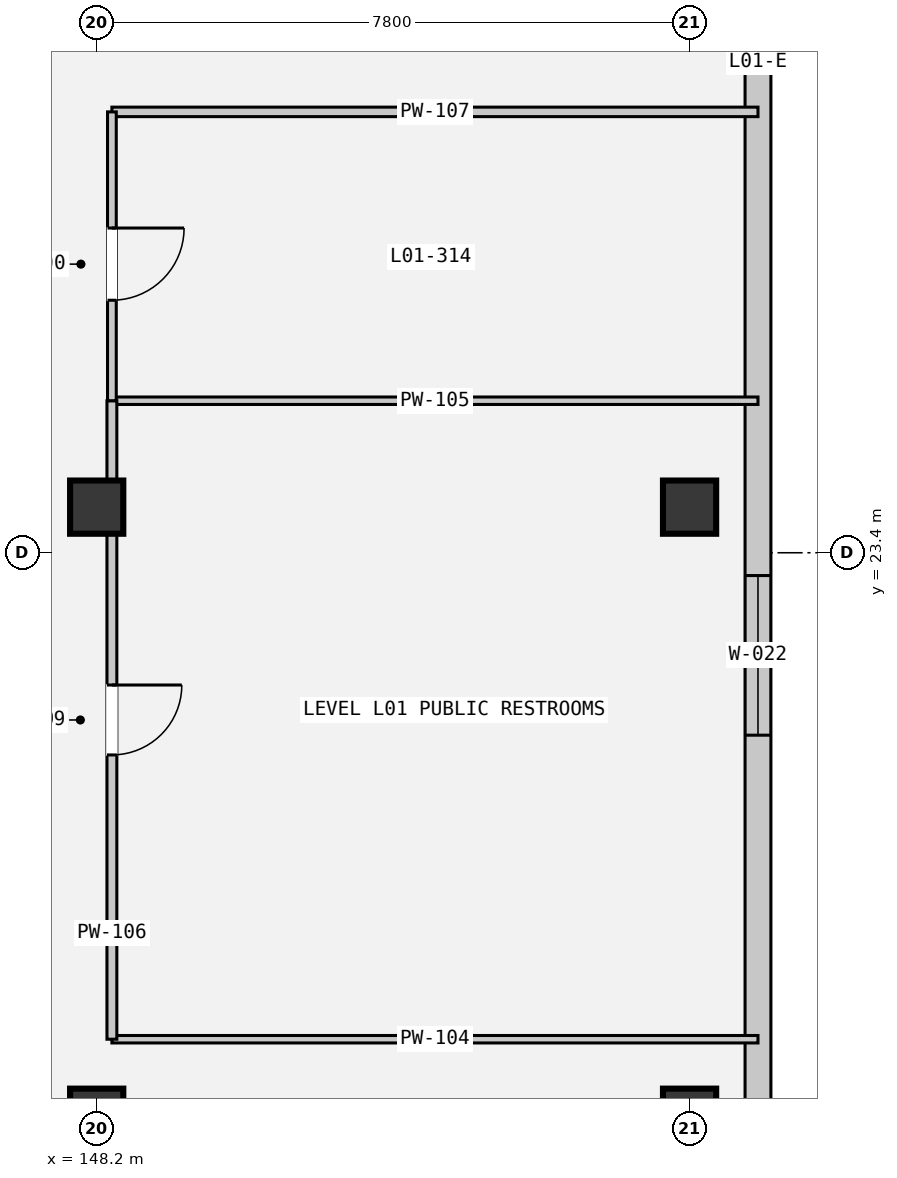
"""IFC4 building model, lengths in metres.
Left out: names, types, materials, properties, quantities, classifications, styles, units other than length and angle.
Written with IfcOpenShell. Run it as: python <this file> out.ifc"""

import sys

from ifc_helpers import new_model, si_unit, direction, frame, frame_2d, origin, origin_2d, place, context, subcontext, project, spatial, rectangle, extrude, element, fill, save


model = new_model("IFC4")
c1 = context("Model", 3, precision=1e-05, world=origin(), true_north=direction((0.0, 1.0)))
c2 = subcontext(c1, "Body", "Model", "MODEL_VIEW")
j1 = project(units=[si_unit("LENGTHUNIT", "METRE"), si_unit("PLANEANGLEUNIT", "RADIAN")], contexts=[c1])
p1 = place(None, origin())
s1 = spatial("IfcSite", under=j1, at=p1, CompositionType="ELEMENT")
p2 = place(p1, origin())
s2 = spatial("IfcBuilding", under=s1, at=p2, CompositionType="ELEMENT")
p3 = place(p2, frame((0.0, 0.0, 5.4)))
s3 = spatial("IfcBuildingStorey", under=s2, at=p3, CompositionType="ELEMENT", Elevation=5.4)
for number, where, z_axis, x_axis in (
    (1, (148.2, 16.0, 0.0), (0.0, 0.0, 1.0), (1.0, 0.0, 0.0)),
    (2, (148.2, 24.0, 0.0), (0.0, 0.0, 1.0), (1.0, 0.0, 0.0)),
    (3, (156.0, 16.0, 0.0), (0.0, 0.0, 1.0), (1.0, 0.0, 0.0)),
    (4, (156.0, 24.0, 0.0), (0.0, 0.0, 1.0), (1.0, 0.0, 0.0)),
):
    element("IfcColumn", number, at=place(p3, frame(where, z_axis=z_axis, x_axis=x_axis)), inside=s3, PredefinedType="COLUMN", context=c2, shape_type="SweptSolid", body=[
        extrude(rectangle(XDim=0.7, YDim=0.7, at=origin_2d()), origin(), (0.0, 0.0, 1.0), 4.8),
    ])
p4 = place(p3, frame((156.9, 16.0, 0.0), z_axis=(0.0, 0.0, 1.0), x_axis=(0.0, 1.0, 0.0)))
e5 = element("IfcWall", 5, at=p4, inside=s3, PredefinedType="SOLIDWALL", context=c2, shape_type="SweptSolid", body=[
    extrude(rectangle(XDim=100.6, YDim=0.34, at=frame_2d((50.3, 0.0))), origin(), (0.0, 0.0, 1.0), 3.86),
])
p5 = place(p4, frame((5.0, 0.0, 0.78)))
e6 = element("IfcOpeningElement", 6, at=p5, cuts=e5, PredefinedType="OPENING", context=c2, shape_type="SweptSolid", body=[
    extrude(rectangle(XDim=2.1, YDim=2.6, at=frame_2d((1.05, 1.3))), frame((0.0, 0.18, 0.0), z_axis=(0.0, -1.0, 0.0), x_axis=(1.0, 0.0, 0.0)), (0.0, 0.0, 1.0), 0.36),
])
p6 = place(p4, frame((20.6, 0.0, 0.78)))
e7 = element("IfcOpeningElement", 7, at=p6, cuts=e5, PredefinedType="OPENING", context=c2, shape_type="SweptSolid", body=[
    extrude(rectangle(XDim=2.1, YDim=2.6, at=frame_2d((1.05, 1.3))), frame((0.0, 0.18, 0.0), z_axis=(0.0, -1.0, 0.0), x_axis=(1.0, 0.0, 0.0)), (0.0, 0.0, 1.0), 0.36),
])
p7 = place(p4, frame((24.5, 0.0, 0.78)))
e8 = element("IfcOpeningElement", 8, at=p7, cuts=e5, PredefinedType="OPENING", context=c2, shape_type="SweptSolid", body=[
    extrude(rectangle(XDim=2.1, YDim=2.6, at=frame_2d((1.05, 1.3))), frame((0.0, 0.18, 0.0), z_axis=(0.0, -1.0, 0.0), x_axis=(1.0, 0.0, 0.0)), (0.0, 0.0, 1.0), 0.36),
])
p8 = place(p4, frame((28.4, 0.0, 0.78)))
e9 = element("IfcOpeningElement", 9, at=p8, cuts=e5, PredefinedType="OPENING", context=c2, shape_type="SweptSolid", body=[
    extrude(rectangle(XDim=2.1, YDim=2.6, at=frame_2d((1.05, 1.3))), frame((0.0, 0.18, 0.0), z_axis=(0.0, -1.0, 0.0), x_axis=(1.0, 0.0, 0.0)), (0.0, 0.0, 1.0), 0.36),
])
p9 = place(p4, frame((32.3, 0.0, 0.78)))
e10 = element("IfcOpeningElement", 10, at=p9, cuts=e5, PredefinedType="OPENING", context=c2, shape_type="SweptSolid", body=[
    extrude(rectangle(XDim=2.1, YDim=2.6, at=frame_2d((1.05, 1.3))), frame((0.0, 0.18, 0.0), z_axis=(0.0, -1.0, 0.0), x_axis=(1.0, 0.0, 0.0)), (0.0, 0.0, 1.0), 0.36),
])
p10 = place(p4, frame((36.2, 0.0, 0.78)))
e11 = element("IfcOpeningElement", 11, at=p10, cuts=e5, PredefinedType="OPENING", context=c2, shape_type="SweptSolid", body=[
    extrude(rectangle(XDim=2.1, YDim=2.6, at=frame_2d((1.05, 1.3))), frame((0.0, 0.18, 0.0), z_axis=(0.0, -1.0, 0.0), x_axis=(1.0, 0.0, 0.0)), (0.0, 0.0, 1.0), 0.36),
])
p11 = place(p4, frame((40.1, 0.0, 0.78)))
e12 = element("IfcOpeningElement", 12, at=p11, cuts=e5, PredefinedType="OPENING", context=c2, shape_type="SweptSolid", body=[
    extrude(rectangle(XDim=2.1, YDim=2.6, at=frame_2d((1.05, 1.3))), frame((0.0, 0.18, 0.0), z_axis=(0.0, -1.0, 0.0), x_axis=(1.0, 0.0, 0.0)), (0.0, 0.0, 1.0), 0.36),
])
p12 = place(p4, frame((44.0, 0.0, 0.78)))
e13 = element("IfcOpeningElement", 13, at=p12, cuts=e5, PredefinedType="OPENING", context=c2, shape_type="SweptSolid", body=[
    extrude(rectangle(XDim=2.1, YDim=2.6, at=frame_2d((1.05, 1.3))), frame((0.0, 0.18, 0.0), z_axis=(0.0, -1.0, 0.0), x_axis=(1.0, 0.0, 0.0)), (0.0, 0.0, 1.0), 0.36),
])
p13 = place(p4, frame((47.9, 0.0, 0.78)))
e14 = element("IfcOpeningElement", 14, at=p13, cuts=e5, PredefinedType="OPENING", context=c2, shape_type="SweptSolid", body=[
    extrude(rectangle(XDim=2.1, YDim=2.6, at=frame_2d((1.05, 1.3))), frame((0.0, 0.18, 0.0), z_axis=(0.0, -1.0, 0.0), x_axis=(1.0, 0.0, 0.0)), (0.0, 0.0, 1.0), 0.36),
])
p14 = place(p4, frame((51.8, 0.0, 0.78)))
e15 = element("IfcOpeningElement", 15, at=p14, cuts=e5, PredefinedType="OPENING", context=c2, shape_type="SweptSolid", body=[
    extrude(rectangle(XDim=2.1, YDim=2.6, at=frame_2d((1.05, 1.3))), frame((0.0, 0.18, 0.0), z_axis=(0.0, -1.0, 0.0), x_axis=(1.0, 0.0, 0.0)), (0.0, 0.0, 1.0), 0.36),
])
p15 = place(p4, frame((63.5, 0.0, 0.78)))
e16 = element("IfcOpeningElement", 16, at=p15, cuts=e5, PredefinedType="OPENING", context=c2, shape_type="SweptSolid", body=[
    extrude(rectangle(XDim=2.1, YDim=2.6, at=frame_2d((1.05, 1.3))), frame((0.0, 0.18, 0.0), z_axis=(0.0, -1.0, 0.0), x_axis=(1.0, 0.0, 0.0)), (0.0, 0.0, 1.0), 0.36),
])
p16 = place(p4, frame((67.4, 0.0, 0.78)))
e17 = element("IfcOpeningElement", 17, at=p16, cuts=e5, PredefinedType="OPENING", context=c2, shape_type="SweptSolid", body=[
    extrude(rectangle(XDim=2.1, YDim=2.6, at=frame_2d((1.05, 1.3))), frame((0.0, 0.18, 0.0), z_axis=(0.0, -1.0, 0.0), x_axis=(1.0, 0.0, 0.0)), (0.0, 0.0, 1.0), 0.36),
])
p17 = place(p4, frame((71.3, 0.0, 0.78)))
e18 = element("IfcOpeningElement", 18, at=p17, cuts=e5, PredefinedType="OPENING", context=c2, shape_type="SweptSolid", body=[
    extrude(rectangle(XDim=2.1, YDim=2.6, at=frame_2d((1.05, 1.3))), frame((0.0, 0.18, 0.0), z_axis=(0.0, -1.0, 0.0), x_axis=(1.0, 0.0, 0.0)), (0.0, 0.0, 1.0), 0.36),
])
p18 = place(p4, frame((79.1, 0.0, 0.78)))
e19 = element("IfcOpeningElement", 19, at=p18, cuts=e5, PredefinedType="OPENING", context=c2, shape_type="SweptSolid", body=[
    extrude(rectangle(XDim=2.1, YDim=2.6, at=frame_2d((1.05, 1.3))), frame((0.0, 0.18, 0.0), z_axis=(0.0, -1.0, 0.0), x_axis=(1.0, 0.0, 0.0)), (0.0, 0.0, 1.0), 0.36),
])
p19 = place(p4, frame((86.9, 0.0, 0.78)))
e20 = element("IfcOpeningElement", 20, at=p19, cuts=e5, PredefinedType="OPENING", context=c2, shape_type="SweptSolid", body=[
    extrude(rectangle(XDim=2.1, YDim=2.6, at=frame_2d((1.05, 1.3))), frame((0.0, 0.18, 0.0), z_axis=(0.0, -1.0, 0.0), x_axis=(1.0, 0.0, 0.0)), (0.0, 0.0, 1.0), 0.36),
])
p20 = place(p4, frame((94.7, 0.0, 0.78)))
e21 = element("IfcOpeningElement", 21, at=p20, cuts=e5, PredefinedType="OPENING", context=c2, shape_type="SweptSolid", body=[
    extrude(rectangle(XDim=2.1, YDim=2.6, at=frame_2d((1.05, 1.3))), frame((0.0, 0.18, 0.0), z_axis=(0.0, -1.0, 0.0), x_axis=(1.0, 0.0, 0.0)), (0.0, 0.0, 1.0), 0.36),
])
for number, where, z_axis, x_axis in (
    (22, (148.4, 17.0, 0.0), (0.0, 0.0, 1.0), (1.0, 0.0, 0.0)),
    (23, (156.9, 25.4, 0.0), (0.0, 0.0, 1.0), (-1.0, 0.0, 0.0)),
):
    element("IfcWall", number, at=place(p3, frame(where, z_axis=z_axis, x_axis=x_axis)), inside=s3, PredefinedType="PARTITIONING", context=c2, shape_type="SweptSolid", body=[
        extrude(rectangle(XDim=8.5, YDim=0.098, at=frame_2d((4.25, 0.0))), origin(), (0.0, 0.0, 1.0), 3.45),
    ])
p21 = place(p3, frame((148.4, 25.4, 0.0), z_axis=(0.0, 0.0, 1.0), x_axis=(0.0, -1.0, 0.0)))
e24 = element("IfcWall", 24, at=p21, inside=s3, PredefinedType="PARTITIONING", context=c2, shape_type="SweptSolid", body=[
    extrude(rectangle(XDim=8.4, YDim=0.13, at=frame_2d((4.2, 0.0))), origin(), (0.0, 0.0, 1.0), 3.45),
])
p22 = place(p21, frame((3.74, 0.0, 0.0)))
e25 = element("IfcOpeningElement", 25, at=p22, cuts=e24, PredefinedType="OPENING", context=c2, shape_type="SweptSolid", body=[
    extrude(rectangle(XDim=0.92, YDim=2.1, at=frame_2d((0.46, 1.05))), frame((0.0, 0.075, 0.0), z_axis=(0.0, -1.0, 0.0), x_axis=(1.0, 0.0, 0.0)), (0.0, 0.0, 1.0), 0.15),
])
p23 = place(p3, frame((156.9, 29.2, 0.0), z_axis=(0.0, 0.0, 1.0), x_axis=(-1.0, 0.0, 0.0)))
e26 = element("IfcWall", 26, at=p23, inside=s3, PredefinedType="PARTITIONING", context=c2, shape_type="SweptSolid", body=[
    extrude(rectangle(XDim=8.5, YDim=0.125, at=frame_2d((4.25, 0.0))), origin(), (0.0, 0.0, 1.0), 3.45),
])
p24 = place(p3, frame((148.4, 29.2, 0.0), z_axis=(0.0, 0.0, 1.0), x_axis=(0.0, -1.0, 0.0)))
e27 = element("IfcWall", 27, at=p24, inside=s3, PredefinedType="PARTITIONING", context=c2, shape_type="SweptSolid", body=[
    extrude(rectangle(XDim=3.8, YDim=0.115, at=frame_2d((1.9, 0.0))), origin(), (0.0, 0.0, 1.0), 3.45),
])
p25 = place(p24, frame((1.528, 0.0, 0.0)))
e28 = element("IfcOpeningElement", 28, at=p25, cuts=e27, PredefinedType="OPENING", context=c2, shape_type="SweptSolid", body=[
    extrude(rectangle(XDim=0.95, YDim=2.1, at=frame_2d((0.475, 1.05))), frame((0.0, 0.067, 0.0), z_axis=(0.0, -1.0, 0.0), x_axis=(1.0, 0.0, 0.0)), (0.0, 0.0, 1.0), 0.135),
])
p26 = place(p5, origin())
e29 = element("IfcWindow", 29, at=p26, inside=s3, PartitioningType="SINGLE_PANEL", PredefinedType="WINDOW", context=c2, shape_type="SweptSolid", body=[
    extrude(rectangle(XDim=2.1, YDim=2.6, at=frame_2d((1.05, 1.3))), frame((0.0, 0.03, 0.0), z_axis=(0.0, -1.0, 0.0), x_axis=(1.0, 0.0, 0.0)), (0.0, 0.0, 1.0), 0.06),
])
fill(e6, e29)
p27 = place(p22, origin())
e30 = element("IfcDoor", 30, at=p27, inside=s3, OperationType="SINGLE_SWING_RIGHT", PredefinedType="DOOR", context=c2, shape_type="SweptSolid", body=[
    extrude(rectangle(XDim=0.92, YDim=2.1, at=frame_2d((0.46, 1.05))), frame((0.0, 0.025, 0.0), z_axis=(0.0, -1.0, 0.0), x_axis=(1.0, 0.0, 0.0)), (0.0, 0.0, 1.0), 0.05),
])
fill(e25, e30)
p28 = place(p25, origin())
e31 = element("IfcDoor", 31, at=p28, inside=s3, OperationType="SINGLE_SWING_LEFT", PredefinedType="DOOR", context=c2, shape_type="SweptSolid", body=[
    extrude(rectangle(XDim=0.95, YDim=2.1, at=frame_2d((0.475, 1.05))), frame((0.0, 0.025, 0.0), z_axis=(0.0, -1.0, 0.0), x_axis=(1.0, 0.0, 0.0)), (0.0, 0.0, 1.0), 0.05),
])
fill(e28, e31)
save(model, sys.argv[1])
